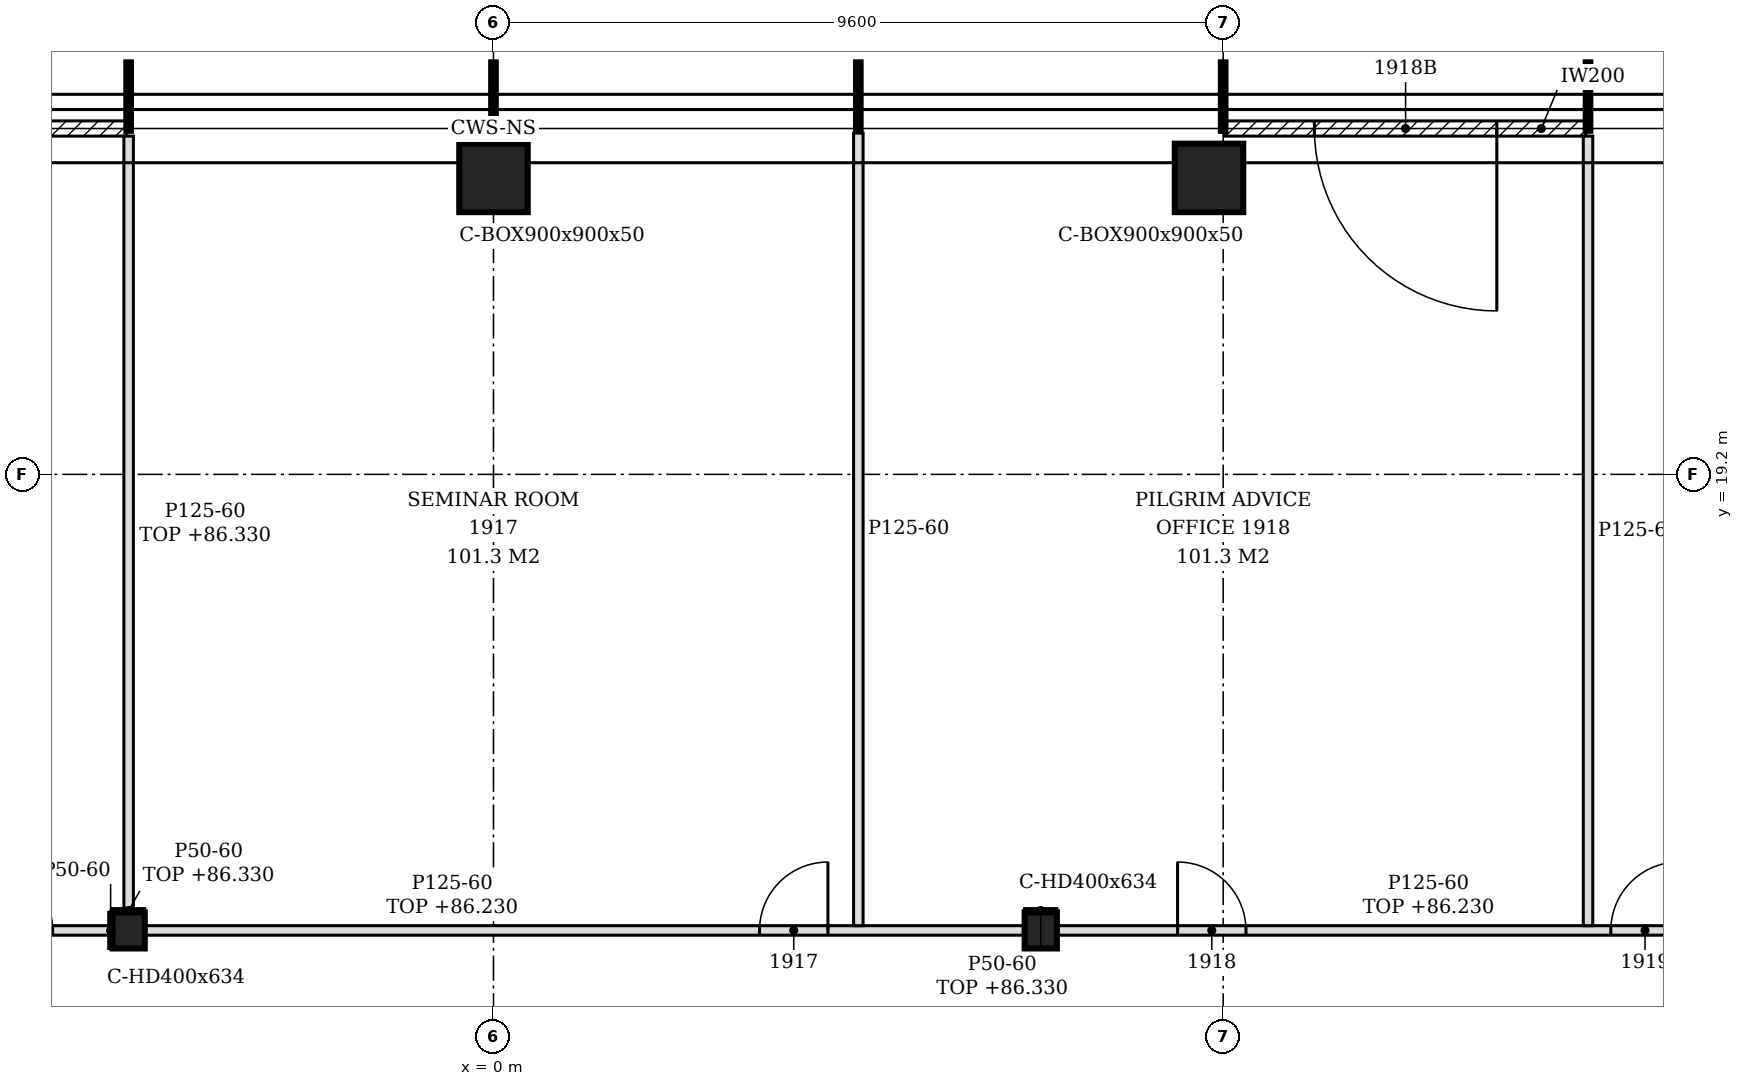
"""IFC4 building model, lengths in metres.
Left out: names, types, materials, properties, quantities, classifications, styles, units other than length and angle.
Written with IfcOpenShell. Run it as: python <this file> out.ifc"""

import sys

from ifc_helpers import new_model, si_unit, direction, frame, frame_2d, origin, origin_2d, place, context, subcontext, project, spatial, polyline, rectangle, hollow_rectangle, i_section, outline, extrude, clip, halfspace, element, fill, save


model = new_model("IFC4")
c1 = context("Model", 3, precision=1e-05, world=origin(), true_north=direction((0.0, 1.0)))
c2 = subcontext(c1, "Body", "Model", "MODEL_VIEW")
j1 = project(units=[si_unit("LENGTHUNIT", "METRE"), si_unit("PLANEANGLEUNIT", "RADIAN")], contexts=[c1])
p1 = place(None, origin())
s1 = spatial("IfcSite", under=j1, at=p1, CompositionType="ELEMENT")
p2 = place(p1, origin())
s2 = spatial("IfcBuilding", under=s1, at=p2, CompositionType="ELEMENT")
p3 = place(p2, frame((0.0, 0.0, 83.4)))
s3 = spatial("IfcBuildingStorey", under=s2, at=p3, CompositionType="ELEMENT", Elevation=83.4)
for number, where, z_axis, x_axis in (
    (1, (9.414, 23.1, -0.15), (0.0, 0.0, 1.0), (1.0, 0.0, 0.0)),
    (2, (0.0, 23.1, -0.15), (0.0, 0.0, 1.0), (1.0, 0.0, 0.0)),
):
    element("IfcColumn", number, at=place(p3, frame(where, z_axis=z_axis, x_axis=x_axis)), inside=s3, PredefinedType="COLUMN", context=c2, shape_type="Clipping", body=[
        clip(extrude(hollow_rectangle(XDim=0.9, YDim=0.9, WallThickness=0.05, at=origin_2d()), origin(), (0.0, 0.0, 1.0), 3.6), halfspace(frame((0.0, 0.0, 3.576), z_axis=(0.0, 0.0, 1.0), x_axis=(1.0, 0.0, 0.0)), False)),
    ])
for number, where, z_axis, x_axis in (
    (3, (-4.8, 13.2, -0.15), (0.0, 0.0, 1.0), (1.0, 0.0, 0.0)),
    (4, (7.2, 13.2, -0.15), (0.0, 0.0, 1.0), (1.0, 0.0, 0.0)),
):
    element("IfcColumn", number, at=place(p3, frame(where, z_axis=z_axis, x_axis=x_axis)), inside=s3, PredefinedType="COLUMN", context=c2, shape_type="SweptSolid", body=[
        extrude(i_section(OverallWidth=0.424, OverallDepth=0.474, WebThickness=0.048, FlangeThickness=0.077, FilletRadius=0.015, at=origin_2d()), origin(), (0.0, 0.0, 1.0), 3.6),
    ])
p4 = place(p3, frame((14.37, 23.75, 0.0), z_axis=(0.0, 0.0, 1.0), x_axis=(-1.0, 0.0, 0.0)))
e5 = element("IfcWall", 5, at=p4, inside=s3, PredefinedType="NOTDEFINED", context=c2, shape_type="SweptSolid", body=[
    extrude(rectangle(XDim=4.74, YDim=0.2, at=frame_2d((2.37, 0.0))), origin(), (0.0, 0.0, 1.0), 3.45),
])
p5 = place(p4, frame((1.17, 0.0, 0.0)))
e6 = element("IfcOpeningElement", 6, at=p5, cuts=e5, PredefinedType="OPENING", context=c2, shape_type="SweptSolid", body=[
    extrude(rectangle(XDim=2.4, YDim=2.4, at=frame_2d((1.2, 1.2))), frame((0.0, 0.11, 0.0), z_axis=(0.0, -1.0, 0.0), x_axis=(1.0, 0.0, 0.0)), (0.0, 0.0, 1.0), 0.22),
])
p6 = place(p3, frame((-4.83, 23.75, 0.0), z_axis=(0.0, 0.0, 1.0), x_axis=(-1.0, 0.0, 0.0)))
e7 = element("IfcWall", 7, at=p6, inside=s3, PredefinedType="NOTDEFINED", context=c2, shape_type="SweptSolid", body=[
    extrude(rectangle(XDim=4.74, YDim=0.2, at=frame_2d((2.37, 0.0))), origin(), (0.0, 0.0, 1.0), 3.45),
])
p7 = place(p6, frame((1.17, 0.0, 0.0)))
e8 = element("IfcOpeningElement", 8, at=p7, cuts=e7, PredefinedType="OPENING", context=c2, shape_type="SweptSolid", body=[
    extrude(rectangle(XDim=2.4, YDim=2.4, at=frame_2d((1.2, 1.2))), frame((0.0, 0.11, 0.0), z_axis=(0.0, -1.0, 0.0), x_axis=(1.0, 0.0, 0.0)), (0.0, 0.0, 1.0), 0.22),
])
p8 = place(p3, frame((-20.413, 13.2, 0.0), z_axis=(0.0, 0.0, 1.0), x_axis=(1.0, 0.0, 0.0)))
e9 = element("IfcWall", 9, at=p8, inside=s3, PredefinedType="PARTITIONING", context=c2, shape_type="SweptSolid", body=[
    extrude(outline(polyline([(0.0, 0.0), (15.401, 0.0), (15.4, 3.45), (6.163, 3.45), (6.16, 2.93), (5.863, 2.93), (5.861, 3.45), (0.0, 3.45), (0.0, 0.0)])), frame((0.0, 0.062, 0.0), z_axis=(0.0, -1.0, 0.0), x_axis=(1.0, 0.0, 0.0)), (0.0, 0.0, 1.0), 0.125),
])
p9 = place(p8, frame((13.712, 0.0, 0.0)))
e10 = element("IfcOpeningElement", 10, at=p9, cuts=e9, PredefinedType="OPENING", context=c2, shape_type="SweptSolid", body=[
    extrude(rectangle(XDim=0.9, YDim=2.1, at=frame_2d((0.45, 1.05))), frame((0.0, 0.073, 0.0), z_axis=(0.0, -1.0, 0.0), x_axis=(1.0, 0.0, 0.0)), (0.0, 0.0, 1.0), 0.145),
])
p10 = place(p3, frame((-4.588, 13.2, 0.0), z_axis=(0.0, 0.0, 1.0), x_axis=(1.0, 0.0, 0.0)))
e11 = element("IfcWall", 11, at=p10, inside=s3, PredefinedType="PARTITIONING", context=c2, shape_type="SweptSolid", body=[
    extrude(rectangle(XDim=11.576, YDim=0.125, at=frame_2d((5.788, 0.0))), origin(), (0.0, 0.0, 1.0), 2.83),
])
p11 = place(p10, frame((8.088, 0.0, 0.0)))
e12 = element("IfcOpeningElement", 12, at=p11, cuts=e11, PredefinedType="OPENING", context=c2, shape_type="SweptSolid", body=[
    extrude(rectangle(XDim=0.9, YDim=2.1, at=frame_2d((0.45, 1.05))), frame((0.0, 0.073, 0.0), z_axis=(0.0, -1.0, 0.0), x_axis=(1.0, 0.0, 0.0)), (0.0, 0.0, 1.0), 0.145),
])
p12 = place(p3, frame((7.412, 13.2, 0.0), z_axis=(0.0, 0.0, 1.0), x_axis=(1.0, 0.0, 0.0)))
e13 = element("IfcWall", 13, at=p12, inside=s3, PredefinedType="PARTITIONING", context=c2, shape_type="SweptSolid", body=[
    extrude(rectangle(XDim=11.576, YDim=0.125, at=frame_2d((5.788, 0.0))), origin(), (0.0, 0.0, 1.0), 2.83),
])
p13 = place(p12, frame((1.588, 0.0, 0.0)))
e14 = element("IfcOpeningElement", 14, at=p13, cuts=e13, PredefinedType="OPENING", context=c2, shape_type="SweptSolid", body=[
    extrude(rectangle(XDim=0.9, YDim=2.1, at=frame_2d((0.45, 1.05))), frame((0.0, 0.073, 0.0), z_axis=(0.0, -1.0, 0.0), x_axis=(1.0, 0.0, 0.0)), (0.0, 0.0, 1.0), 0.145),
])
p14 = place(p12, frame((7.288, 0.0, 0.0)))
e15 = element("IfcOpeningElement", 15, at=p14, cuts=e13, PredefinedType="OPENING", context=c2, shape_type="SweptSolid", body=[
    extrude(rectangle(XDim=0.9, YDim=2.1, at=frame_2d((0.45, 1.05))), frame((0.0, 0.073, 0.0), z_axis=(0.0, -1.0, 0.0), x_axis=(1.0, 0.0, 0.0)), (0.0, 0.0, 1.0), 0.145),
])
p15 = place(p3, frame((4.8, 13.262, 0.0), z_axis=(0.0, 0.0, 1.0), x_axis=(0.0, 1.0, 0.0)))
e16 = element("IfcWall", 16, at=p15, inside=s3, PredefinedType="PARTITIONING", context=c2, shape_type="SweptSolid", body=[
    extrude(outline(polyline([(0.0, 0.0), (10.427, 0.0), (10.427, 3.45), (9.988, 3.45), (9.986, 2.93), (9.688, 2.93), (9.686, 3.45), (6.042, 3.45), (6.041, 2.88), (5.833, 2.88), (5.831, 3.45), (0.087, 3.45), (0.085, 2.83), (0.0, 2.83), (0.0, 0.0)])), frame((0.0, 0.062, 0.0), z_axis=(0.0, -1.0, 0.0), x_axis=(1.0, 0.0, 0.0)), (0.0, 0.0, 1.0), 0.125),
])
p16 = place(p3, frame((14.4, 13.262, 0.0), z_axis=(0.0, 0.0, 1.0), x_axis=(0.0, 1.0, 0.0)))
e17 = element("IfcWall", 17, at=p16, inside=s3, PredefinedType="PARTITIONING", context=c2, shape_type="SweptSolid", body=[
    extrude(outline(polyline([(0.0, 0.0), (10.387, 0.0), (10.387, 3.45), (9.988, 3.45), (9.986, 2.93), (9.688, 2.93), (9.686, 3.45), (6.042, 3.45), (6.041, 2.88), (5.833, 2.88), (5.831, 3.45), (0.087, 3.45), (0.085, 2.83), (0.0, 2.83), (0.0, 0.0)])), frame((0.0, 0.062, 0.0), z_axis=(0.0, -1.0, 0.0), x_axis=(1.0, 0.0, 0.0)), (0.0, 0.0, 1.0), 0.125),
])
p17 = place(p3, frame((-4.8, 13.437, 0.0), z_axis=(0.0, 0.0, 1.0), x_axis=(0.0, 1.0, 0.0)))
e18 = element("IfcWall", 18, at=p17, inside=s3, PredefinedType="PARTITIONING", context=c2, shape_type="SweptSolid", body=[
    extrude(rectangle(XDim=10.213, YDim=0.125, at=frame_2d((5.106, 0.0))), origin(), (0.0, 0.0, 1.0), 2.93),
])
for number, where, z_axis, x_axis in (
    (19, (-5.012, 13.462, 0.0), (0.0, 0.0, 1.0), (1.0, 0.0, 0.0)),
    (20, (6.988, 13.462, 0.0), (0.0, 0.0, 1.0), (1.0, 0.0, 0.0)),
):
    element("IfcWall", number, at=place(p3, frame(where, z_axis=z_axis, x_axis=x_axis)), inside=s3, PredefinedType="PARTITIONING", context=c2, shape_type="SweptSolid", body=[
        extrude(rectangle(XDim=0.424, YDim=0.05, at=frame_2d((0.212, 0.0))), origin(), (0.0, 0.0, 1.0), 2.93),
    ])
p18 = place(p3, frame((-5.037, 12.963, 0.0), z_axis=(0.0, 0.0, 1.0), x_axis=(0.0, 1.0, 0.0)))
e21 = element("IfcWall", 21, at=p18, inside=s3, PredefinedType="PARTITIONING", context=c2, shape_type="SweptSolid", body=[
    extrude(rectangle(XDim=0.474, YDim=0.05, at=frame_2d((0.237, 0.0))), origin(), (0.0, 0.0, 1.0), 3.45),
])
p19 = place(p5, origin())
e22 = element("IfcDoor", 22, at=p19, inside=s3, OperationType="SINGLE_SWING_LEFT", PredefinedType="DOOR", context=c2, shape_type="SweptSolid", body=[
    extrude(rectangle(XDim=2.4, YDim=2.4, at=frame_2d((1.2, 1.2))), frame((0.0, 0.025, 0.0), z_axis=(0.0, -1.0, 0.0), x_axis=(1.0, 0.0, 0.0)), (0.0, 0.0, 1.0), 0.05),
])
fill(e6, e22)
p20 = place(p11, origin())
e23 = element("IfcDoor", 23, at=p20, inside=s3, OperationType="SINGLE_SWING_RIGHT", PredefinedType="DOOR", context=c2, shape_type="SweptSolid", body=[
    extrude(rectangle(XDim=0.9, YDim=2.1, at=frame_2d((0.45, 1.05))), frame((0.0, 0.025, 0.0), z_axis=(0.0, -1.0, 0.0), x_axis=(1.0, 0.0, 0.0)), (0.0, 0.0, 1.0), 0.05),
])
fill(e12, e23)
p21 = place(p13, origin())
e24 = element("IfcDoor", 24, at=p21, inside=s3, OperationType="SINGLE_SWING_LEFT", PredefinedType="DOOR", context=c2, shape_type="SweptSolid", body=[
    extrude(rectangle(XDim=0.9, YDim=2.1, at=frame_2d((0.45, 1.05))), frame((0.0, 0.025, 0.0), z_axis=(0.0, -1.0, 0.0), x_axis=(1.0, 0.0, 0.0)), (0.0, 0.0, 1.0), 0.05),
])
fill(e14, e24)
p22 = place(p14, origin())
e25 = element("IfcDoor", 25, at=p22, inside=s3, OperationType="SINGLE_SWING_RIGHT", PredefinedType="DOOR", context=c2, shape_type="SweptSolid", body=[
    extrude(rectangle(XDim=0.9, YDim=2.1, at=frame_2d((0.45, 1.05))), frame((0.0, 0.025, 0.0), z_axis=(0.0, -1.0, 0.0), x_axis=(1.0, 0.0, 0.0)), (0.0, 0.0, 1.0), 0.05),
])
fill(e15, e25)
save(model, sys.argv[1])
